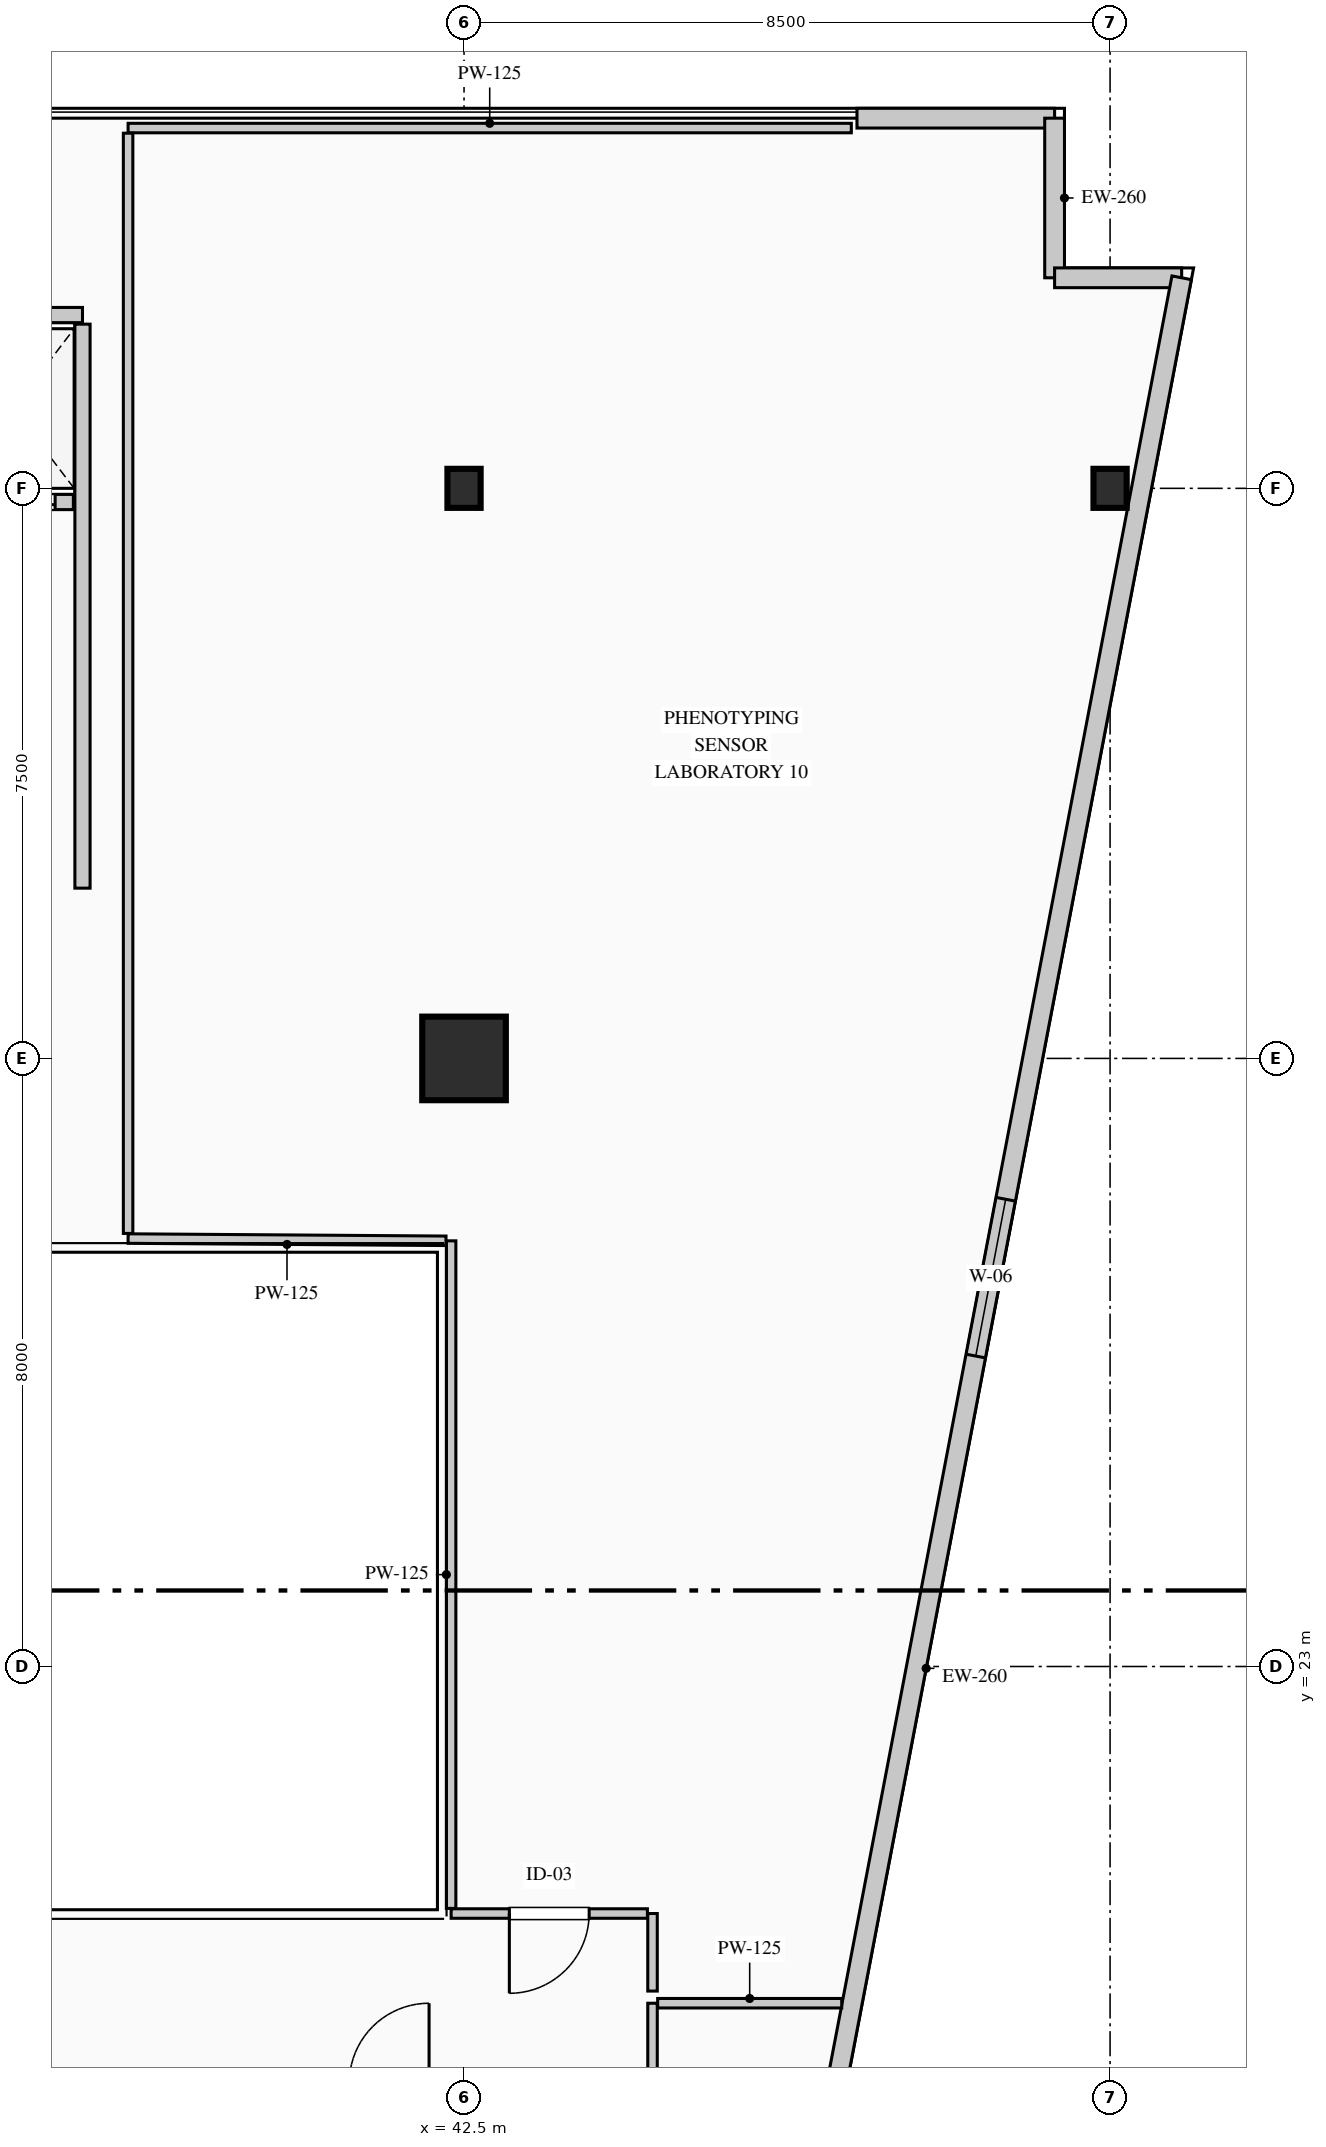
"""IFC4 building model, lengths in metres.
Left out: names, types, materials, properties, quantities, classifications, styles, units other than length and angle.
Written with IfcOpenShell. Run it as: python <this file> out.ifc"""

import sys

from ifc_helpers import new_model, si_unit, direction, frame, frame_2d, origin, origin_2d, place, context, subcontext, project, spatial, rectangle, i_section, extrude, element, fill, save


model = new_model("IFC4")
c1 = context("Model", 3, precision=1e-05, world=origin(), true_north=direction((0.0, 1.0)))
c2 = subcontext(c1, "Body", "Model", "MODEL_VIEW")
j1 = project(units=[si_unit("LENGTHUNIT", "METRE"), si_unit("PLANEANGLEUNIT", "RADIAN")], contexts=[c1])
p1 = place(None, origin())
s1 = spatial("IfcSite", under=j1, at=p1, CompositionType="ELEMENT")
p2 = place(p1, origin())
s2 = spatial("IfcBuilding", under=s1, at=p2, CompositionType="ELEMENT")
p3 = place(p2, frame((0.0, 0.0, 119.3)))
s3 = spatial("IfcBuildingStorey", under=s2, at=p3, CompositionType="ELEMENT", Elevation=119.3)
p4 = place(p3, frame((42.5, 31.0, 0.0), z_axis=(0.0, 0.0, 1.0), x_axis=(1.0, 0.0, 0.0)))
e1 = element("IfcColumn", 1, at=p4, inside=s3, PredefinedType="COLUMN", context=c2, shape_type="SweptSolid", body=[
    extrude(rectangle(XDim=1.1, YDim=1.1, at=origin_2d()), origin(), (0.0, 0.0, 1.0), 3.95),
])
for number, where, z_axis, x_axis in (
    (2, (42.5, 38.5, 0.0), (0.0, 0.0, 1.0), (1.0, 0.0, 0.0)),
    (3, (51.0, 38.5, 0.0), (0.0, 0.0, 1.0), (1.0, 0.0, 0.0)),
):
    element("IfcColumn", number, at=place(p3, frame(where, z_axis=z_axis, x_axis=x_axis)), inside=s3, PredefinedType="COLUMN", context=c2, shape_type="SweptSolid", body=[
        extrude(i_section(OverallWidth=0.437, OverallDepth=0.514, WebThickness=0.061, FlangeThickness=0.077, FilletRadius=0.015, at=origin_2d()), origin(), (0.0, 0.0, 1.0), 3.95),
    ])
p5 = place(p3, frame((47.67, 43.37, 0.0), z_axis=(0.0, 0.0, 1.0), x_axis=(1.0, 0.0, 0.0)))
e4 = element("IfcWall", 4, at=p5, inside=s3, PredefinedType="STANDARD", context=c2, shape_type="SweptSolid", body=[
    extrude(rectangle(XDim=2.6, YDim=0.26, at=frame_2d((1.3, 0.0))), origin(), (0.0, 0.0, 1.0), 3.69),
])
p6 = place(p3, frame((50.27, 43.37, 0.0), z_axis=(0.0, 0.0, 1.0), x_axis=(0.0, -1.0, 0.0)))
e5 = element("IfcWall", 5, at=p6, inside=s3, PredefinedType="STANDARD", context=c2, shape_type="SweptSolid", body=[
    extrude(rectangle(XDim=2.1, YDim=0.26, at=frame_2d((1.05, 0.0))), origin(), (0.0, 0.0, 1.0), 3.69),
])
p7 = place(p3, frame((50.27, 41.27, 0.0), z_axis=(0.0, 0.0, 1.0), x_axis=(1.0, 0.0, 0.0)))
e6 = element("IfcWall", 6, at=p7, inside=s3, PredefinedType="STANDARD", context=c2, shape_type="SweptSolid", body=[
    extrude(rectangle(XDim=1.672, YDim=0.26, at=frame_2d((0.836, 0.0))), origin(), (0.0, 0.0, 1.0), 3.69),
])
p8 = place(p3, frame((51.942, 41.27, 0.0), z_axis=(0.0, 0.0, 1.0), x_axis=(-0.187592192405, -0.982247000173, 0.0)))
e7 = element("IfcWall", 7, at=p8, inside=s3, PredefinedType="STANDARD", context=c2, shape_type="SweptSolid", body=[
    extrude(rectangle(XDim=37.2, YDim=0.26, at=frame_2d((18.6, 0.0))), origin(), (0.0, 0.0, 1.0), 3.69),
])
p9 = place(p8, frame((12.342, 0.0, 0.9)))
e8 = element("IfcOpeningElement", 8, at=p9, cuts=e7, PredefinedType="OPENING", context=c2, shape_type="SweptSolid", body=[
    extrude(rectangle(XDim=2.1, YDim=2.0, at=frame_2d((1.05, 1.0))), frame((0.0, 0.14, 0.0), z_axis=(0.0, -1.0, 0.0), x_axis=(1.0, 0.0, 0.0)), (0.0, 0.0, 1.0), 0.28),
])
p10 = place(p3, frame((30.5, 40.78, 0.0), z_axis=(0.0, 0.0, 1.0), x_axis=(1.0, 0.0, 0.0)))
e9 = element("IfcWall", 9, at=p10, inside=s3, PredefinedType="PARTITIONING", context=c2, shape_type="SweptSolid", body=[
    extrude(rectangle(XDim=6.98, YDim=0.2, at=frame_2d((3.49, 0.0))), origin(), (0.0, 0.0, 1.0), 3.69),
])
p11 = place(p3, frame((37.48, 33.24, 0.0), z_axis=(0.0, 0.0, 1.0), x_axis=(0.0, 1.0, 0.0)))
e10 = element("IfcWall", 10, at=p11, inside=s3, PredefinedType="PARTITIONING", context=c2, shape_type="SweptSolid", body=[
    extrude(rectangle(XDim=7.42, YDim=0.2, at=frame_2d((3.71, 0.0))), origin(), (0.0, 0.0, 1.0), 3.69),
])
p12 = place(p3, frame((30.5, 38.32, 0.0), z_axis=(0.0, 0.0, 1.0), x_axis=(1.0, 0.0, 0.0)))
e11 = element("IfcWall", 11, at=p12, inside=s3, PredefinedType="PARTITIONING", context=c2, shape_type="SweptSolid", body=[
    extrude(rectangle(XDim=6.86, YDim=0.2, at=frame_2d((3.43, 0.0))), origin(), (0.0, 0.0, 1.0), 3.69),
])
p13 = place(p12, frame((0.36, 0.0, 0.0)))
e12 = element("IfcOpeningElement", 12, at=p13, cuts=e11, PredefinedType="OPENING", context=c2, shape_type="SweptSolid", body=[
    extrude(rectangle(XDim=1.1, YDim=2.2, at=frame_2d((0.55, 1.1))), frame((0.0, 0.11, 0.0), z_axis=(0.0, -1.0, 0.0), x_axis=(1.0, 0.0, 0.0)), (0.0, 0.0, 1.0), 0.22),
])
p14 = place(p12, frame((2.08, 0.0, 0.0)))
e13 = element("IfcOpeningElement", 13, at=p14, cuts=e11, PredefinedType="OPENING", context=c2, shape_type="SweptSolid", body=[
    extrude(rectangle(XDim=1.1, YDim=2.2, at=frame_2d((0.55, 1.1))), frame((0.0, 0.11, 0.0), z_axis=(0.0, -1.0, 0.0), x_axis=(1.0, 0.0, 0.0)), (0.0, 0.0, 1.0), 0.22),
])
p15 = place(p12, frame((3.8, 0.0, 0.0)))
e14 = element("IfcOpeningElement", 14, at=p15, cuts=e11, PredefinedType="OPENING", context=c2, shape_type="SweptSolid", body=[
    extrude(rectangle(XDim=1.1, YDim=2.2, at=frame_2d((0.55, 1.1))), frame((0.0, 0.11, 0.0), z_axis=(0.0, -1.0, 0.0), x_axis=(1.0, 0.0, 0.0)), (0.0, 0.0, 1.0), 0.22),
])
p16 = place(p12, frame((5.52, 0.0, 0.0)))
e15 = element("IfcOpeningElement", 15, at=p16, cuts=e11, PredefinedType="OPENING", context=c2, shape_type="SweptSolid", body=[
    extrude(rectangle(XDim=1.1, YDim=2.2, at=frame_2d((0.55, 1.1))), frame((0.0, 0.11, 0.0), z_axis=(0.0, -1.0, 0.0), x_axis=(1.0, 0.0, 0.0)), (0.0, 0.0, 1.0), 0.22),
])
p17 = place(p3, frame((44.98, 17.55, 0.0), z_axis=(0.0, 0.0, 1.0), x_axis=(0.0, 1.0, 0.0)))
e16 = element("IfcWall", 16, at=p17, inside=s3, PredefinedType="PARTITIONING", context=c2, shape_type="SweptSolid", body=[
    extrude(rectangle(XDim=1.02, YDim=0.125, at=frame_2d((0.51, 0.0))), origin(), (0.0, 0.0, 1.0), 3.69),
])
p18 = place(p3, frame((45.048, 18.57, 0.0), z_axis=(0.0, 0.0, 1.0), x_axis=(1.0, 0.0, 0.0)))
e17 = element("IfcWall", 17, at=p18, inside=s3, PredefinedType="PARTITIONING", context=c2, shape_type="SweptSolid", body=[
    extrude(rectangle(XDim=2.422, YDim=0.125, at=frame_2d((1.211, 0.0))), origin(), (0.0, 0.0, 1.0), 3.69),
])
p19 = place(p3, frame((38.08, 43.24, 0.0), z_axis=(0.0, 0.0, 1.0), x_axis=(1.0, 0.0, 0.0)))
e18 = element("IfcWall", 18, at=p19, inside=s3, PredefinedType="PARTITIONING", context=c2, shape_type="SweptSolid", body=[
    extrude(rectangle(XDim=9.515, YDim=0.125, at=frame_2d((4.758, 0.0))), origin(), (0.0, 0.0, 1.0), 3.69),
])
p20 = place(p3, frame((44.98, 18.73, 0.0), z_axis=(0.0, 0.0, 1.0), x_axis=(0.0, 1.0, 0.0)))
e19 = element("IfcWall", 19, at=p20, inside=s3, PredefinedType="PARTITIONING", context=c2, shape_type="SweptSolid", body=[
    extrude(rectangle(XDim=1.02, YDim=0.125, at=frame_2d((0.51, 0.0))), origin(), (0.0, 0.0, 1.0), 3.69),
])
p21 = place(p3, frame((44.913, 19.75, 0.0), z_axis=(0.0, 0.0, 1.0), x_axis=(-1.0, 0.0, 0.0)))
e20 = element("IfcWall", 20, at=p21, inside=s3, PredefinedType="PARTITIONING", context=c2, shape_type="SweptSolid", body=[
    extrude(rectangle(XDim=2.583, YDim=0.125, at=frame_2d((1.291, 0.0))), origin(), (0.0, 0.0, 1.0), 3.69),
])
p22 = place(p21, frame((0.766, 0.0, 0.0)))
e21 = element("IfcOpeningElement", 21, at=p22, cuts=e20, PredefinedType="OPENING", context=c2, shape_type="SweptSolid", body=[
    extrude(rectangle(XDim=1.05, YDim=2.15, at=frame_2d((0.525, 1.075))), frame((0.0, 0.073, 0.0), z_axis=(0.0, -1.0, 0.0), x_axis=(1.0, 0.0, 0.0)), (0.0, 0.0, 1.0), 0.145),
])
p23 = place(p3, frame((42.33, 19.817, 0.0), z_axis=(0.0, 0.0, 1.0), x_axis=(0.0, 1.0, 0.0)))
e22 = element("IfcWall", 22, at=p23, inside=s3, PredefinedType="PARTITIONING", context=c2, shape_type="SweptSolid", body=[
    extrude(rectangle(XDim=8.783, YDim=0.125, at=frame_2d((4.391, 0.0))), origin(), (0.0, 0.0, 1.0), 3.69),
])
p24 = place(p3, frame((42.262, 28.601, 0.0), z_axis=(0.0, 0.0, 1.0), x_axis=(-0.999975466976, 0.007004673168, 0.0)))
e23 = element("IfcWall", 23, at=p24, inside=s3, PredefinedType="PARTITIONING", context=c2, shape_type="SweptSolid", body=[
    extrude(rectangle(XDim=4.182, YDim=0.125, at=frame_2d((2.091, 0.0))), origin(), (0.0, 0.0, 1.0), 3.69),
])
p25 = place(p3, frame((38.08, 28.698, 0.0), z_axis=(0.0, 0.0, 1.0), x_axis=(0.0, 1.0, 0.0)))
e24 = element("IfcWall", 24, at=p25, inside=s3, PredefinedType="PARTITIONING", context=c2, shape_type="SweptSolid", body=[
    extrude(rectangle(XDim=14.475, YDim=0.125, at=frame_2d((7.238, 0.0))), origin(), (0.0, 0.0, 1.0), 3.69),
])
p26 = place(p9, origin())
e25 = element("IfcWindow", 25, at=p26, inside=s3, PartitioningType="DOUBLE_PANEL_VERTICAL", PredefinedType="WINDOW", context=c2, shape_type="SweptSolid", body=[
    extrude(rectangle(XDim=2.1, YDim=2.0, at=frame_2d((1.05, 1.0))), frame((0.0, 0.03, 0.0), z_axis=(0.0, -1.0, 0.0), x_axis=(1.0, 0.0, 0.0)), (0.0, 0.0, 1.0), 0.06),
])
fill(e8, e25)
p27 = place(p16, origin())
e26 = element("IfcDoor", 26, at=p27, inside=s3, OperationType="DOUBLE_DOOR_SLIDING", PredefinedType="DOOR", context=c2, shape_type="SweptSolid", body=[
    extrude(rectangle(XDim=1.1, YDim=2.2, at=frame_2d((0.55, 1.1))), frame((0.0, 0.025, 0.0), z_axis=(0.0, -1.0, 0.0), x_axis=(1.0, 0.0, 0.0)), (0.0, 0.0, 1.0), 0.05),
])
fill(e15, e26)
p28 = place(p22, origin())
e27 = element("IfcDoor", 27, at=p28, inside=s3, OperationType="SINGLE_SWING_RIGHT", PredefinedType="DOOR", context=c2, shape_type="SweptSolid", body=[
    extrude(rectangle(XDim=1.05, YDim=2.15, at=frame_2d((0.525, 1.075))), frame((0.0, 0.025, 0.0), z_axis=(0.0, -1.0, 0.0), x_axis=(1.0, 0.0, 0.0)), (0.0, 0.0, 1.0), 0.05),
])
fill(e21, e27)
save(model, sys.argv[1])
